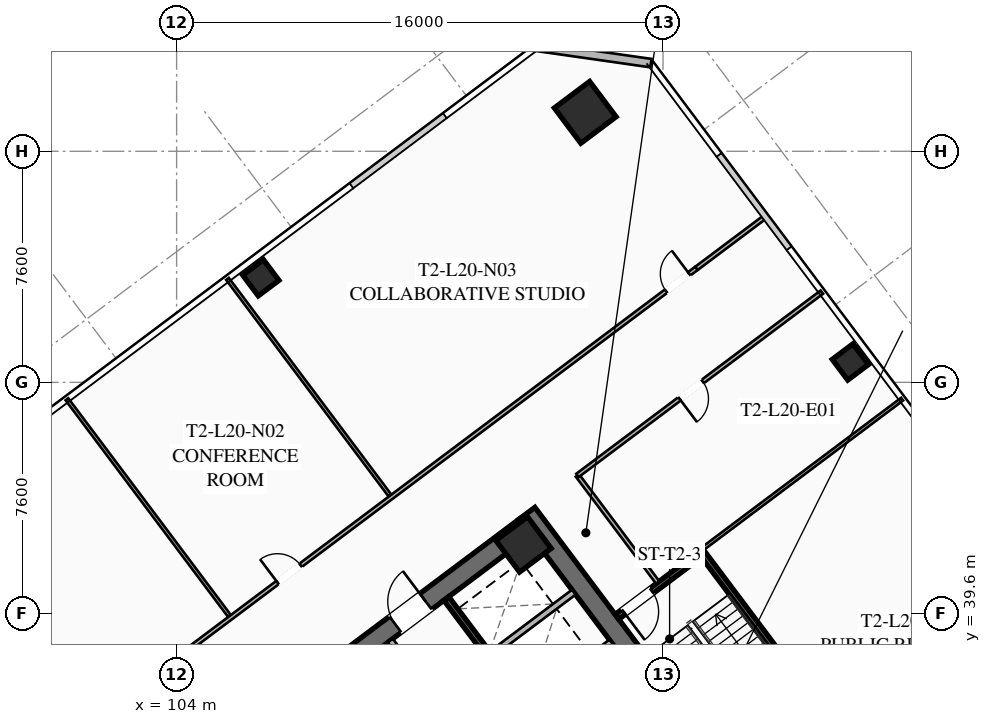
"""IFC4 building model, lengths in metres.
Left out: names, types, materials, properties, quantities, classifications, styles, units other than length and angle.
Written with IfcOpenShell. Run it as: python <this file> out.ifc"""

import sys

from ifc_helpers import new_model, si_unit, direction, frame, frame_2d, origin, origin_2d, place, context, subcontext, project, spatial, rectangle, hollow_rectangle, extrude, element, fill, save


model = new_model("IFC4")
c1 = context("Model", 3, precision=1e-05, world=origin(), true_north=direction((0.0, 1.0)))
c2 = subcontext(c1, "Body", "Model", "MODEL_VIEW")
j1 = project(units=[si_unit("LENGTHUNIT", "METRE"), si_unit("PLANEANGLEUNIT", "RADIAN")], contexts=[c1])
p1 = place(None, origin())
s1 = spatial("IfcSite", under=j1, at=p1, CompositionType="ELEMENT")
p2 = place(p1, origin())
s2 = spatial("IfcBuilding", under=s1, at=p2, CompositionType="ELEMENT")
p3 = place(p2, frame((0.0, 0.0, 77.85)))
s3 = spatial("IfcBuildingStorey", under=s2, at=p3, CompositionType="ELEMENT", Elevation=77.85)
p4 = place(p3, frame((115.524, 42.893, 0.0), z_axis=(0.0, 0.0, 1.0), x_axis=(0.600005007985, -0.799996243986, 0.0)))
e1 = element("IfcWall", 1, at=p4, inside=s3, PredefinedType="SHEAR", context=c2, shape_type="SweptSolid", body=[
    extrude(rectangle(XDim=15.6, YDim=0.65, at=frame_2d((7.8, 0.0))), origin(), (0.0, 0.0, 1.0), 3.55),
])
p5 = place(p3, frame((103.571, 33.522, 0.0), z_axis=(0.0, 0.0, 1.0), x_axis=(0.799998028465, 0.600002628705, 0.0)))
e2 = element("IfcWall", 2, at=p5, inside=s3, PredefinedType="SHEAR", context=c2, shape_type="SweptSolid", body=[
    extrude(rectangle(XDim=14.86, YDim=0.65, at=frame_2d((7.43, 0.0))), origin(), (0.0, 0.0, 1.0), 3.55),
])
p6 = place(p5, frame((4.48, 0.0, 0.0)))
e3 = element("IfcOpeningElement", 3, at=p6, cuts=e2, PredefinedType="OPENING", context=c2, shape_type="SweptSolid", body=[
    extrude(rectangle(XDim=1.25, YDim=2.25, at=frame_2d((0.625, 1.125))), frame((0.0, 0.335, 0.0), z_axis=(0.0, -1.0, 0.0), x_axis=(1.0, 0.0, 0.0)), (0.0, 0.0, 1.0), 0.67),
])
p7 = place(p5, frame((9.53, 0.0, 0.0)))
e4 = element("IfcOpeningElement", 4, at=p7, cuts=e2, PredefinedType="OPENING", context=c2, shape_type="SweptSolid", body=[
    extrude(rectangle(XDim=1.25, YDim=2.25, at=frame_2d((0.625, 1.125))), frame((0.0, 0.335, 0.0), z_axis=(0.0, -1.0, 0.0), x_axis=(1.0, 0.0, 0.0)), (0.0, 0.0, 1.0), 0.67),
])
p8 = place(p3, frame((115.41, 41.87, 0.0), z_axis=(0.0, 0.0, 1.0), x_axis=(0.799999996291, 0.600000004945, 0.0)))
e5 = element("IfcColumn", 5, at=p8, inside=s3, PredefinedType="COLUMN", context=c2, shape_type="SweptSolid", body=[
    extrude(hollow_rectangle(XDim=1.3, YDim=1.3, WallThickness=0.05, at=origin_2d()), origin(), (0.0, 0.0, 1.0), 3.35),
])
p9 = place(p3, frame((117.44, 56.08, 0.0), z_axis=(0.0, 0.0, 1.0), x_axis=(0.799999996291, 0.600000004945, 0.0)))
e6 = element("IfcColumn", 6, at=p9, inside=s3, PredefinedType="COLUMN", context=c2, shape_type="SweptSolid", body=[
    extrude(hollow_rectangle(XDim=1.45, YDim=1.45, WallThickness=0.055, at=origin_2d()), origin(), (0.0, 0.0, 1.0), 3.35),
])
for number, where, z_axis, x_axis in (
    (7, (126.16, 47.87, 0.0), (0.0, 0.0, 1.0), (0.8, 0.6, 0.0)),
    (8, (106.77, 50.64, 0.0), (0.0, 0.0, 1.0), (0.8, 0.6, 0.0)),
):
    element("IfcColumn", number, at=place(p3, frame(where, z_axis=z_axis, x_axis=x_axis)), inside=s3, PredefinedType="COLUMN", context=c2, shape_type="SweptSolid", body=[
        extrude(hollow_rectangle(XDim=0.85, YDim=0.85, WallThickness=0.035, at=origin_2d()), origin(), (0.0, 0.0, 1.0), 3.35),
    ])
p10 = place(p3, frame((115.82, 58.24, 0.0), z_axis=(0.0, 0.0, 1.0), x_axis=(0.989948214866, -0.141430307517, 0.0)))
e9 = element("IfcWall", 9, at=p10, inside=s3, PredefinedType="SOLIDWALL", context=c2, shape_type="SweptSolid", body=[
    extrude(rectangle(XDim=3.818, YDim=0.28, at=frame_2d((1.909, 0.0))), origin(), (0.0, 0.0, 1.0), 3.35),
])
p11 = place(p3, frame((112.87, 40.09, 0.0), z_axis=(0.0, 0.0, 1.0), x_axis=(0.599975393228, -0.800018454488, 0.0)))
e10 = element("IfcWall", 10, at=p11, inside=s3, PredefinedType="SHEAR", context=c2, shape_type="SweptSolid", body=[
    extrude(rectangle(XDim=6.35, YDim=0.2, at=frame_2d((3.175, 0.0))), origin(), (0.0, 0.0, 1.0), 3.35),
])
for number, where, z_axis, x_axis in (
    (11, (115.59, 36.63, 0.0), (0.0, 0.0, 1.0), (0.8, 0.6, 0.0)),
    (12, (114.36, 38.27, 0.0), (0.0, 0.0, 1.0), (0.8, 0.6, 0.0)),
):
    element("IfcWall", number, at=place(p3, frame(where, z_axis=z_axis, x_axis=x_axis)), inside=s3, PredefinedType="SOLIDWALL", context=c2, shape_type="SweptSolid", body=[
        extrude(rectangle(XDim=3.38, YDim=0.2, at=frame_2d((1.69, 0.0))), origin(), (0.0, 0.0, 1.0), 3.35),
    ])
p12 = place(p3, frame((115.11, 33.27, 0.0), z_axis=(0.0, 0.0, 1.0), x_axis=(-0.600011488909, 0.79999138319, 0.0)))
e13 = element("IfcWall", 13, at=p12, inside=s3, PredefinedType="SOLIDWALL", context=c2, shape_type="SweptSolid", body=[
    extrude(rectangle(XDim=6.8, YDim=0.2, at=frame_2d((3.4, 0.0))), origin(), (0.0, 0.0, 1.0), 3.35),
])
p13 = place(p3, frame((125.304, 36.228, 0.0), z_axis=(0.0, 0.0, 1.0), x_axis=(-0.59998851072, 0.800008616831, 0.0)))
e14 = element("IfcWall", 14, at=p13, inside=s3, PredefinedType="SHEAR", context=c2, shape_type="SweptSolid", body=[
    extrude(rectangle(XDim=6.8, YDim=0.2, at=frame_2d((3.4, 0.0))), origin(), (0.0, 0.0, 1.0), 3.35),
])
p14 = place(p3, frame((121.204, 41.528, 0.0), z_axis=(0.0, 0.0, 1.0), x_axis=(-0.800017232136, -0.599977023131, 0.0)))
e15 = element("IfcWall", 15, at=p14, inside=s3, PredefinedType="SHEAR", context=c2, shape_type="SweptSolid", body=[
    extrude(rectangle(XDim=3.4, YDim=0.2, at=frame_2d((1.7, 0.0))), origin(), (0.0, 0.0, 1.0), 3.35),
])
p15 = place(p14, frame((1.975, 0.0, 0.0)))
e16 = element("IfcOpeningElement", 16, at=p15, cuts=e15, PredefinedType="OPENING", context=c2, shape_type="SweptSolid", body=[
    extrude(rectangle(XDim=1.15, YDim=2.2, at=frame_2d((0.575, 1.1))), frame((0.0, 0.11, 0.0), z_axis=(0.0, -1.0, 0.0), x_axis=(1.0, 0.0, 0.0)), (0.0, 0.0, 1.0), 0.22),
])
p16 = place(p3, frame((119.824, 40.618, 0.0), z_axis=(0.0, 0.0, 1.0), x_axis=(-0.599982243973, 0.800013316712, 0.0)))
e17 = element("IfcWall", 17, at=p16, inside=s3, PredefinedType="PARTITIONING", context=c2, shape_type="SweptSolid", body=[
    extrude(rectangle(XDim=4.4, YDim=0.135, at=frame_2d((2.2, 0.0))), origin(), (0.0, 0.0, 1.0), 2.703),
])
p17 = place(p3, frame((98.516, 34.012, 0.0), z_axis=(0.0, 0.0, 1.0), x_axis=(0.8, 0.6, 0.0)))
e18 = element("IfcWall", 18, at=p17, inside=s3, PredefinedType="PARTITIONING", context=c2, shape_type="SweptSolid", body=[
    extrude(rectangle(XDim=28.23, YDim=0.135, at=frame_2d((14.115, 0.0))), origin(), (0.0, 0.0, 1.0), 2.703),
])
p18 = place(p17, frame((0.3, 0.0, 0.0)))
e19 = element("IfcOpeningElement", 19, at=p18, cuts=e18, PredefinedType="OPENING", context=c2, shape_type="SweptSolid", body=[
    extrude(rectangle(XDim=0.95, YDim=2.05, at=frame_2d((0.475, 1.025))), frame((0.0, 0.077, 0.0), z_axis=(0.0, -1.0, 0.0), x_axis=(1.0, 0.0, 0.0)), (0.0, 0.0, 1.0), 0.155),
])
p19 = place(p17, frame((11.004, 0.0, 0.0)))
e20 = element("IfcOpeningElement", 20, at=p19, cuts=e18, PredefinedType="OPENING", context=c2, shape_type="SweptSolid", body=[
    extrude(rectangle(XDim=0.95, YDim=2.05, at=frame_2d((0.475, 1.025))), frame((0.0, 0.077, 0.0), z_axis=(0.0, -1.0, 0.0), x_axis=(1.0, 0.0, 0.0)), (0.0, 0.0, 1.0), 0.155),
])
p20 = place(p17, frame((26.98, 0.0, 0.0)))
e21 = element("IfcOpeningElement", 21, at=p20, cuts=e18, PredefinedType="OPENING", context=c2, shape_type="SweptSolid", body=[
    extrude(rectangle(XDim=0.95, YDim=2.05, at=frame_2d((0.475, 1.025))), frame((0.0, 0.077, 0.0), z_axis=(0.0, -1.0, 0.0), x_axis=(1.0, 0.0, 0.0)), (0.0, 0.0, 1.0), 0.155),
])
p21 = place(p3, frame((121.1, 50.95, 0.0), z_axis=(0.0, 0.0, 1.0), x_axis=(0.799989647378, 0.600013803248, 0.0)))
e22 = element("IfcWall", 22, at=p21, inside=s3, PredefinedType="PARTITIONING", context=c2, shape_type="SweptSolid", body=[
    extrude(rectangle(XDim=2.83, YDim=0.135, at=frame_2d((1.415, 0.0))), origin(), (0.0, 0.0, 1.0), 2.703),
])
for number, where, z_axis, x_axis in (
    (23, (105.732, 39.524, 0.0), (0.0, 0.0, 1.0), (-0.6, 0.8, 0.0)),
    (24, (111.012, 43.484, 0.0), (0.0, 0.0, 1.0), (-0.6, 0.8, 0.0)),
):
    element("IfcWall", number, at=place(p3, frame(where, z_axis=z_axis, x_axis=x_axis)), inside=s3, PredefinedType="PARTITIONING", context=c2, shape_type="SweptSolid", body=[
        extrude(rectangle(XDim=8.9, YDim=0.11, at=frame_2d((4.45, 0.0))), origin(), (0.0, 0.0, 1.0), 2.703),
    ])
p22 = place(p3, frame((125.224, 50.168, 0.0), z_axis=(0.0, 0.0, 1.0), x_axis=(-0.8, -0.6, 0.0)))
e25 = element("IfcWall", 25, at=p22, inside=s3, PredefinedType="PARTITIONING", context=c2, shape_type="SweptSolid", body=[
    extrude(rectangle(XDim=10.05, YDim=0.135, at=frame_2d((5.025, 0.0))), origin(), (0.0, 0.0, 1.0), 2.703),
])
p23 = place(p22, frame((4.9, 0.0, 0.0)))
e26 = element("IfcOpeningElement", 26, at=p23, cuts=e25, PredefinedType="OPENING", context=c2, shape_type="SweptSolid", body=[
    extrude(rectangle(XDim=0.95, YDim=2.05, at=frame_2d((0.475, 1.025))), frame((0.0, 0.077, 0.0), z_axis=(0.0, -1.0, 0.0), x_axis=(1.0, 0.0, 0.0)), (0.0, 0.0, 1.0), 0.155),
])
p24 = place(p3, frame((127.864, 46.648, 0.0), z_axis=(0.0, 0.0, 1.0), x_axis=(-0.800007145523, -0.599990472518, 0.0)))
e27 = element("IfcWall", 27, at=p24, inside=s3, PredefinedType="PARTITIONING", context=c2, shape_type="SweptSolid", body=[
    extrude(rectangle(XDim=8.2, YDim=0.11, at=frame_2d((4.1, 0.0))), origin(), (0.0, 0.0, 1.0), 2.703),
])
p25 = place(p7, origin())
e28 = element("IfcDoor", 28, at=p25, inside=s3, OperationType="SINGLE_SWING_RIGHT", PredefinedType="DOOR", context=c2, shape_type="SweptSolid", body=[
    extrude(rectangle(XDim=1.25, YDim=2.25, at=frame_2d((0.625, 1.125))), frame((0.0, 0.025, 0.0), z_axis=(0.0, -1.0, 0.0), x_axis=(1.0, 0.0, 0.0)), (0.0, 0.0, 1.0), 0.05),
])
fill(e4, e28)
p26 = place(p15, origin())
e29 = element("IfcDoor", 29, at=p26, inside=s3, OperationType="SINGLE_SWING_RIGHT", PredefinedType="DOOR", context=c2, shape_type="SweptSolid", body=[
    extrude(rectangle(XDim=1.15, YDim=2.2, at=frame_2d((0.575, 1.1))), frame((0.0, 0.025, 0.0), z_axis=(0.0, -1.0, 0.0), x_axis=(1.0, 0.0, 0.0)), (0.0, 0.0, 1.0), 0.05),
])
fill(e16, e29)
p27 = place(p19, origin())
e30 = element("IfcDoor", 30, at=p27, inside=s3, OperationType="SINGLE_SWING_LEFT", PredefinedType="DOOR", context=c2, shape_type="SweptSolid", body=[
    extrude(rectangle(XDim=0.95, YDim=2.05, at=frame_2d((0.475, 1.025))), frame((0.0, 0.025, 0.0), z_axis=(0.0, -1.0, 0.0), x_axis=(1.0, 0.0, 0.0)), (0.0, 0.0, 1.0), 0.05),
])
fill(e20, e30)
p28 = place(p20, origin())
e31 = element("IfcDoor", 31, at=p28, inside=s3, OperationType="SINGLE_SWING_RIGHT", PredefinedType="DOOR", context=c2, shape_type="SweptSolid", body=[
    extrude(rectangle(XDim=0.95, YDim=2.05, at=frame_2d((0.475, 1.025))), frame((0.0, 0.025, 0.0), z_axis=(0.0, -1.0, 0.0), x_axis=(1.0, 0.0, 0.0)), (0.0, 0.0, 1.0), 0.05),
])
fill(e21, e31)
p29 = place(p23, origin())
e32 = element("IfcDoor", 32, at=p29, inside=s3, OperationType="SINGLE_SWING_RIGHT", PredefinedType="DOOR", context=c2, shape_type="SweptSolid", body=[
    extrude(rectangle(XDim=0.95, YDim=2.05, at=frame_2d((0.475, 1.025))), frame((0.0, 0.025, 0.0), z_axis=(0.0, -1.0, 0.0), x_axis=(1.0, 0.0, 0.0)), (0.0, 0.0, 1.0), 0.05),
])
fill(e26, e32)
save(model, sys.argv[1])
